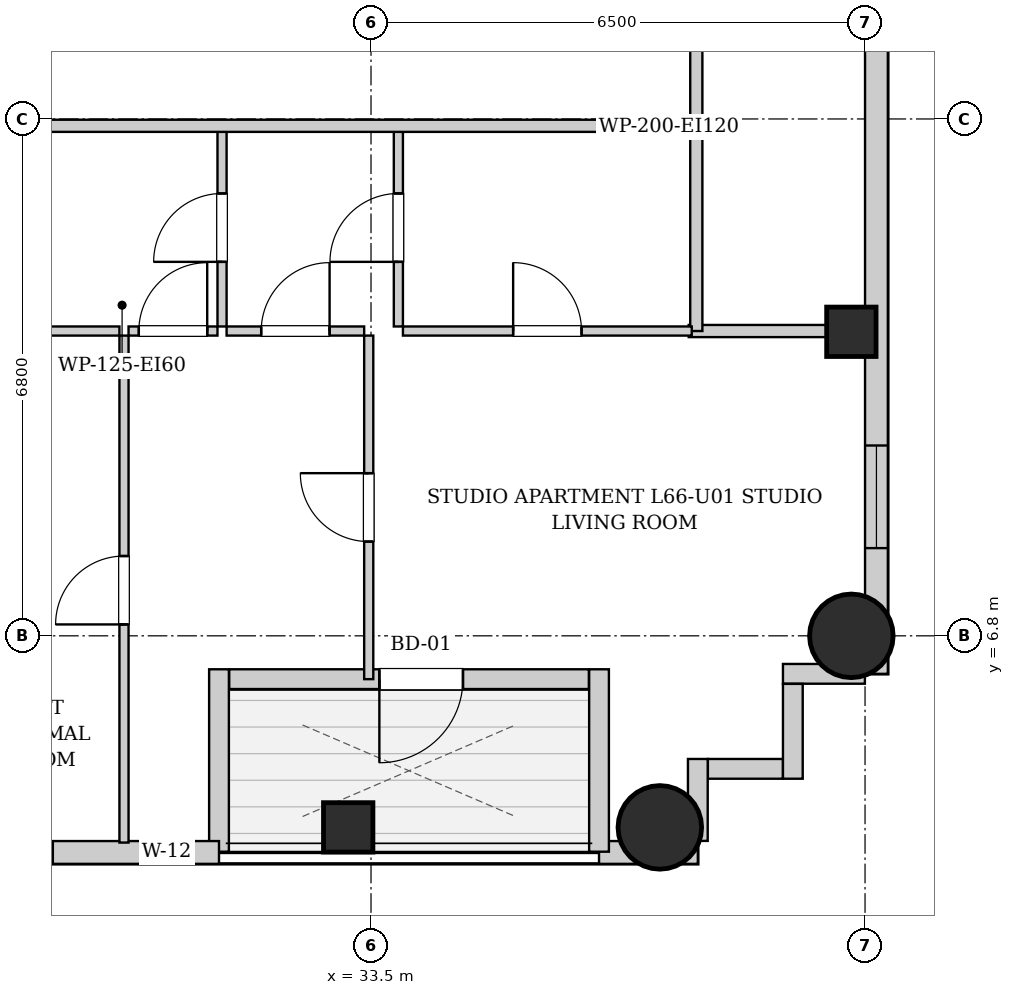
"""IFC4 building model, lengths in metres.
Left out: names, types, materials, properties, quantities, classifications, styles, units other than length and angle.
Written with IfcOpenShell. Run it as: python <this file> out.ifc"""

import sys

from ifc_helpers import new_model, si_unit, direction, frame, frame_2d, origin, origin_2d, place, context, subcontext, project, spatial, rectangle, circle, extrude, element, fill, save


model = new_model("IFC4")
c1 = context("Model", 3, precision=1e-05, world=origin(), true_north=direction((0.0, 1.0)))
c2 = subcontext(c1, "Body", "Model", "MODEL_VIEW")
j1 = project(units=[si_unit("LENGTHUNIT", "METRE"), si_unit("PLANEANGLEUNIT", "RADIAN")], contexts=[c1])
p1 = place(None, origin())
s1 = spatial("IfcSite", under=j1, at=p1, CompositionType="ELEMENT")
p2 = place(p1, origin())
s2 = spatial("IfcBuilding", under=s1, at=p2, CompositionType="ELEMENT")
p3 = place(p2, frame((0.0, 0.0, 227.5)))
s3 = spatial("IfcBuildingStorey", under=s2, at=p3, CompositionType="ELEMENT", Elevation=227.5)
p4 = place(p3, frame((33.2, 4.28, 0.0), z_axis=(0.0, 0.0, 1.0), x_axis=(1.0, 0.0, 0.0)))
e1 = element("IfcColumn", 1, at=p4, inside=s3, PredefinedType="COLUMN", context=c2, shape_type="SweptSolid", body=[
    extrude(rectangle(XDim=0.65, YDim=0.65, at=origin_2d()), origin(), (0.0, 0.0, 1.0), 3.4),
])
for number, where, z_axis, x_axis in (
    (2, (37.3, 4.28, 0.0), (0.0, 0.0, 1.0), (1.0, 0.0, 0.0)),
    (3, (39.82, 6.8, 0.0), (0.0, 0.0, 1.0), (1.0, 0.0, 0.0)),
):
    element("IfcColumn", number, at=place(p3, frame(where, z_axis=z_axis, x_axis=x_axis)), inside=s3, PredefinedType="COLUMN", context=c2, shape_type="SweptSolid", body=[
        extrude(circle(Radius=0.55, at=origin_2d()), origin(), (0.0, 0.0, 1.0), 3.4),
    ])
p5 = place(p3, frame((39.82, 10.8, 0.0), z_axis=(0.0, 0.0, 1.0), x_axis=(1.0, 0.0, 0.0)))
e4 = element("IfcColumn", 4, at=p5, inside=s3, PredefinedType="COLUMN", context=c2, shape_type="SweptSolid", body=[
    extrude(rectangle(XDim=0.65, YDim=0.65, at=origin_2d()), origin(), (0.0, 0.0, 1.0), 3.4),
])
p6 = place(p3, frame((40.15, 37.7, 0.0), z_axis=(0.0, 0.0, 1.0), x_axis=(0.0, -1.0, 0.0)))
e5 = element("IfcWall", 5, at=p6, inside=s3, PredefinedType="SOLIDWALL", context=c2, shape_type="SweptSolid", body=[
    extrude(rectangle(XDim=31.4, YDim=0.3, at=frame_2d((15.7, 0.0))), origin(), (0.0, 0.0, 1.0), 3.14),
])
p7 = place(p6, frame((28.396, 0.0, 0.55)))
e6 = element("IfcOpeningElement", 6, at=p7, cuts=e5, PredefinedType="OPENING", context=c2, shape_type="SweptSolid", body=[
    extrude(rectangle(XDim=1.35, YDim=1.2, at=frame_2d((0.675, 0.6))), frame((0.0, 0.16, 0.0), z_axis=(0.0, -1.0, 0.0), x_axis=(1.0, 0.0, 0.0)), (0.0, 0.0, 1.0), 0.32),
])
p8 = place(p6, frame((1.653, 0.0, 0.55)))
e7 = element("IfcOpeningElement", 7, at=p8, cuts=e5, PredefinedType="OPENING", context=c2, shape_type="SweptSolid", body=[
    extrude(rectangle(XDim=1.35, YDim=1.2, at=frame_2d((0.675, 0.6))), frame((0.0, 0.16, 0.0), z_axis=(0.0, -1.0, 0.0), x_axis=(1.0, 0.0, 0.0)), (0.0, 0.0, 1.0), 0.32),
])
p9 = place(p6, frame((19.683, 0.0, 0.55)))
e8 = element("IfcOpeningElement", 8, at=p9, cuts=e5, PredefinedType="OPENING", context=c2, shape_type="SweptSolid", body=[
    extrude(rectangle(XDim=1.35, YDim=1.2, at=frame_2d((0.675, 0.6))), frame((0.0, 0.16, 0.0), z_axis=(0.0, -1.0, 0.0), x_axis=(1.0, 0.0, 0.0)), (0.0, 0.0, 1.0), 0.32),
])
p10 = place(p6, frame((10.367, 0.0, 0.55)))
e9 = element("IfcOpeningElement", 9, at=p10, cuts=e5, PredefinedType="OPENING", context=c2, shape_type="SweptSolid", body=[
    extrude(rectangle(XDim=1.35, YDim=1.2, at=frame_2d((0.675, 0.6))), frame((0.0, 0.16, 0.0), z_axis=(0.0, -1.0, 0.0), x_axis=(1.0, 0.0, 0.0)), (0.0, 0.0, 1.0), 0.32),
])
p11 = place(p3, frame((37.8, 3.95, 0.0), z_axis=(0.0, 0.0, 1.0), x_axis=(-1.0, 0.0, 0.0)))
e10 = element("IfcWall", 10, at=p11, inside=s3, PredefinedType="SOLIDWALL", context=c2, shape_type="SweptSolid", body=[
    extrude(rectangle(XDim=1.3, YDim=0.3, at=frame_2d((0.65, 0.0))), origin(), (0.0, 0.0, 1.0), 3.14),
])
p12 = place(p3, frame((36.5, 3.96, 0.0), z_axis=(0.0, 0.0, 1.0), x_axis=(0.0, 1.0, 0.0)))
e11 = element("IfcWall", 11, at=p12, inside=s3, PredefinedType="SOLIDWALL", context=c2, shape_type="SweptSolid", body=[
    extrude(rectangle(XDim=2.4, YDim=0.26, at=frame_2d((1.2, 0.0))), origin(), (0.0, 0.0, 1.0), 3.14),
])
p13 = place(p3, frame((36.366, 6.23, 0.0), z_axis=(0.0, 0.0, 1.0), x_axis=(-1.0, 0.0, 0.0)))
e12 = element("IfcWall", 12, at=p13, inside=s3, PredefinedType="SOLIDWALL", context=c2, shape_type="SweptSolid", body=[
    extrude(rectangle(XDim=4.732, YDim=0.26, at=frame_2d((2.366, 0.0))), origin(), (0.0, 0.0, 1.0), 3.14),
])
p14 = place(p13, frame((1.656, 0.0, 0.0)))
e13 = element("IfcOpeningElement", 13, at=p14, cuts=e12, PredefinedType="OPENING", context=c2, shape_type="SweptSolid", body=[
    extrude(rectangle(XDim=1.1, YDim=2.0, at=frame_2d((0.55, 1.0))), frame((0.0, 0.14, 0.0), z_axis=(0.0, -1.0, 0.0), x_axis=(1.0, 0.0, 0.0)), (0.0, 0.0, 1.0), 0.28),
])
p15 = place(p3, frame((31.5, 6.36, 0.0), z_axis=(0.0, 0.0, 1.0), x_axis=(0.0, -1.0, 0.0)))
e14 = element("IfcWall", 14, at=p15, inside=s3, PredefinedType="SOLIDWALL", context=c2, shape_type="SweptSolid", body=[
    extrude(rectangle(XDim=2.4, YDim=0.26, at=frame_2d((1.2, 0.0))), origin(), (0.0, 0.0, 1.0), 3.14),
])
p16 = place(p3, frame((31.5, 3.95, 0.0), z_axis=(0.0, 0.0, 1.0), x_axis=(-1.0, 0.0, 0.0)))
e15 = element("IfcWall", 15, at=p16, inside=s3, PredefinedType="SOLIDWALL", context=c2, shape_type="SweptSolid", body=[
    extrude(rectangle(XDim=12.5, YDim=0.3, at=frame_2d((6.25, 0.0))), origin(), (0.0, 0.0, 1.0), 3.14),
])
p17 = place(p16, frame((11.171, 0.0, 0.55)))
e16 = element("IfcOpeningElement", 16, at=p17, cuts=e15, PredefinedType="OPENING", context=c2, shape_type="SweptSolid", body=[
    extrude(rectangle(XDim=0.85, YDim=1.2, at=frame_2d((0.425, 0.6))), frame((0.0, 0.16, 0.0), z_axis=(0.0, -1.0, 0.0), x_axis=(1.0, 0.0, 0.0)), (0.0, 0.0, 1.0), 0.32),
])
p18 = place(p16, frame((9.0, 0.0, 0.55)))
e17 = element("IfcOpeningElement", 17, at=p18, cuts=e15, PredefinedType="OPENING", context=c2, shape_type="SweptSolid", body=[
    extrude(rectangle(XDim=1.35, YDim=1.2, at=frame_2d((0.675, 0.6))), frame((0.0, 0.16, 0.0), z_axis=(0.0, -1.0, 0.0), x_axis=(1.0, 0.0, 0.0)), (0.0, 0.0, 1.0), 0.32),
])
p19 = place(p16, frame((2.186, 0.0, 0.55)))
e18 = element("IfcOpeningElement", 18, at=p19, cuts=e15, PredefinedType="OPENING", context=c2, shape_type="SweptSolid", body=[
    extrude(rectangle(XDim=1.35, YDim=1.2, at=frame_2d((0.675, 0.6))), frame((0.0, 0.16, 0.0), z_axis=(0.0, -1.0, 0.0), x_axis=(1.0, 0.0, 0.0)), (0.0, 0.0, 1.0), 0.32),
])
p20 = place(p16, frame((0.35, 0.0, 0.55)))
e19 = element("IfcOpeningElement", 19, at=p20, cuts=e15, PredefinedType="OPENING", context=c2, shape_type="SweptSolid", body=[
    extrude(rectangle(XDim=0.68, YDim=1.2, at=frame_2d((0.34, 0.6))), frame((0.0, 0.16, 0.0), z_axis=(0.0, -1.0, 0.0), x_axis=(1.0, 0.0, 0.0)), (0.0, 0.0, 1.0), 0.32),
])
p21 = place(p3, frame((39.998, 6.3, 0.0), z_axis=(0.0, 0.0, 1.0), x_axis=(-1.0, 0.0, 0.0)))
e20 = element("IfcWall", 20, at=p21, inside=s3, PredefinedType="SOLIDWALL", context=c2, shape_type="SweptSolid", body=[
    extrude(rectangle(XDim=1.078, YDim=0.26, at=frame_2d((0.539, 0.0))), origin(), (0.0, 0.0, 1.0), 3.14),
])
p22 = place(p3, frame((39.05, 6.168, 0.0), z_axis=(0.0, 0.0, 1.0), x_axis=(0.0, -1.0, 0.0)))
e21 = element("IfcWall", 21, at=p22, inside=s3, PredefinedType="SOLIDWALL", context=c2, shape_type="SweptSolid", body=[
    extrude(rectangle(XDim=1.248, YDim=0.26, at=frame_2d((0.624, 0.0))), origin(), (0.0, 0.0, 1.0), 3.14),
])
p23 = place(p3, frame((38.918, 5.05, 0.0), z_axis=(0.0, 0.0, 1.0), x_axis=(-1.0, 0.0, 0.0)))
e22 = element("IfcWall", 22, at=p23, inside=s3, PredefinedType="SOLIDWALL", context=c2, shape_type="SweptSolid", body=[
    extrude(rectangle(XDim=0.986, YDim=0.26, at=frame_2d((0.493, 0.0))), origin(), (0.0, 0.0, 1.0), 3.14),
])
p24 = place(p3, frame((37.8, 5.18, 0.0), z_axis=(0.0, 0.0, 1.0), x_axis=(0.0, -1.0, 0.0)))
e23 = element("IfcWall", 23, at=p24, inside=s3, PredefinedType="SOLIDWALL", context=c2, shape_type="SweptSolid", body=[
    extrude(rectangle(XDim=1.078, YDim=0.26, at=frame_2d((0.539, 0.0))), origin(), (0.0, 0.0, 1.0), 3.14),
])
p25 = place(p3, frame((37.78, 13.51, 0.0), z_axis=(0.0, 0.0, 1.0), x_axis=(0.0, 1.0, 0.0)))
e24 = element("IfcWall", 24, at=p25, inside=s3, PredefinedType="PARTITIONING", context=c2, shape_type="SweptSolid", body=[
    extrude(rectangle(XDim=1.58, YDim=0.16, at=frame_2d((0.79, 0.0))), origin(), (0.0, 0.0, 1.0), 3.14),
])
p26 = place(p3, frame((37.68, 10.81, 0.0), z_axis=(0.0, 0.0, 1.0), x_axis=(1.0, 0.0, 0.0)))
e25 = element("IfcWall", 25, at=p26, inside=s3, PredefinedType="PARTITIONING", context=c2, shape_type="SweptSolid", body=[
    extrude(rectangle(XDim=2.34, YDim=0.16, at=frame_2d((1.17, 0.0))), origin(), (0.0, 0.0, 1.0), 3.14),
])
p27 = place(p3, frame((37.78, 10.81, 0.0), z_axis=(0.0, 0.0, 1.0), x_axis=(0.0, 1.0, 0.0)))
e26 = element("IfcWall", 26, at=p27, inside=s3, PredefinedType="PARTITIONING", context=c2, shape_type="SweptSolid", body=[
    extrude(rectangle(XDim=2.66, YDim=0.16, at=frame_2d((1.33, 0.0))), origin(), (0.0, 0.0, 1.0), 3.14),
])
p28 = place(p3, frame((31.54, 10.87, 0.0), z_axis=(0.0, 0.0, 1.0), x_axis=(0.0, 1.0, 0.0)))
e27 = element("IfcWall", 27, at=p28, inside=s3, PredefinedType="PARTITIONING", context=c2, shape_type="SweptSolid", body=[
    extrude(rectangle(XDim=2.6, YDim=0.12, at=frame_2d((1.3, 0.0))), origin(), (0.0, 0.0, 1.0), 3.14),
])
p29 = place(p28, frame((0.85, 0.0, 0.0)))
e28 = element("IfcOpeningElement", 28, at=p29, cuts=e27, PredefinedType="OPENING", context=c2, shape_type="SweptSolid", body=[
    extrude(rectangle(XDim=0.9, YDim=2.05, at=frame_2d((0.45, 1.025))), frame((0.0, 0.07, 0.0), z_axis=(0.0, -1.0, 0.0), x_axis=(1.0, 0.0, 0.0)), (0.0, 0.0, 1.0), 0.14),
])
p30 = place(p3, frame((29.28, 10.81, 0.0), z_axis=(0.0, 0.0, 1.0), x_axis=(1.0, 0.0, 0.0)))
e29 = element("IfcWall", 29, at=p30, inside=s3, PredefinedType="PARTITIONING", context=c2, shape_type="SweptSolid", body=[
    extrude(rectangle(XDim=0.91, YDim=0.12, at=frame_2d((0.455, 0.0))), origin(), (0.0, 0.0, 1.0), 3.14),
])
p31 = place(p3, frame((30.31, 10.81, 0.0), z_axis=(0.0, 0.0, 1.0), x_axis=(1.0, 0.0, 0.0)))
e30 = element("IfcWall", 30, at=p31, inside=s3, PredefinedType="PARTITIONING", context=c2, shape_type="SweptSolid", body=[
    extrude(rectangle(XDim=1.17, YDim=0.12, at=frame_2d((0.585, 0.0))), origin(), (0.0, 0.0, 1.0), 3.14),
])
p32 = place(p31, frame((0.135, 0.0, 0.0)))
e31 = element("IfcOpeningElement", 31, at=p32, cuts=e30, PredefinedType="OPENING", context=c2, shape_type="SweptSolid", body=[
    extrude(rectangle(XDim=0.9, YDim=2.05, at=frame_2d((0.45, 1.025))), frame((0.0, 0.07, 0.0), z_axis=(0.0, -1.0, 0.0), x_axis=(1.0, 0.0, 0.0)), (0.0, 0.0, 1.0), 0.14),
])
p33 = place(p3, frame((33.86, 10.87, 0.0), z_axis=(0.0, 0.0, 1.0), x_axis=(0.0, 1.0, 0.0)))
e32 = element("IfcWall", 32, at=p33, inside=s3, PredefinedType="PARTITIONING", context=c2, shape_type="SweptSolid", body=[
    extrude(rectangle(XDim=2.6, YDim=0.12, at=frame_2d((1.3, 0.0))), origin(), (0.0, 0.0, 1.0), 3.14),
])
p34 = place(p33, frame((0.85, 0.0, 0.0)))
e33 = element("IfcOpeningElement", 33, at=p34, cuts=e32, PredefinedType="OPENING", context=c2, shape_type="SweptSolid", body=[
    extrude(rectangle(XDim=0.9, YDim=2.05, at=frame_2d((0.45, 1.025))), frame((0.0, 0.07, 0.0), z_axis=(0.0, -1.0, 0.0), x_axis=(1.0, 0.0, 0.0)), (0.0, 0.0, 1.0), 0.14),
])
p35 = place(p3, frame((31.6, 10.81, 0.0), z_axis=(0.0, 0.0, 1.0), x_axis=(1.0, 0.0, 0.0)))
e34 = element("IfcWall", 34, at=p35, inside=s3, PredefinedType="PARTITIONING", context=c2, shape_type="SweptSolid", body=[
    extrude(rectangle(XDim=1.81, YDim=0.12, at=frame_2d((0.905, 0.0))), origin(), (0.0, 0.0, 1.0), 3.14),
])
p36 = place(p35, frame((0.455, 0.0, 0.0)))
e35 = element("IfcOpeningElement", 35, at=p36, cuts=e34, PredefinedType="OPENING", context=c2, shape_type="SweptSolid", body=[
    extrude(rectangle(XDim=0.9, YDim=2.05, at=frame_2d((0.45, 1.025))), frame((0.0, 0.07, 0.0), z_axis=(0.0, -1.0, 0.0), x_axis=(1.0, 0.0, 0.0)), (0.0, 0.0, 1.0), 0.14),
])
p37 = place(p3, frame((33.92, 10.81, 0.0), z_axis=(0.0, 0.0, 1.0), x_axis=(1.0, 0.0, 0.0)))
e36 = element("IfcWall", 36, at=p37, inside=s3, PredefinedType="PARTITIONING", context=c2, shape_type="SweptSolid", body=[
    extrude(rectangle(XDim=3.8, YDim=0.12, at=frame_2d((1.9, 0.0))), origin(), (0.0, 0.0, 1.0), 3.14),
])
p38 = place(p37, frame((1.45, 0.0, 0.0)))
e37 = element("IfcOpeningElement", 37, at=p38, cuts=e36, PredefinedType="OPENING", context=c2, shape_type="SweptSolid", body=[
    extrude(rectangle(XDim=0.9, YDim=2.05, at=frame_2d((0.45, 1.025))), frame((0.0, 0.07, 0.0), z_axis=(0.0, -1.0, 0.0), x_axis=(1.0, 0.0, 0.0)), (0.0, 0.0, 1.0), 0.14),
])
p39 = place(p3, frame((30.25, 4.08, 0.0), z_axis=(0.0, 0.0, 1.0), x_axis=(0.0, 1.0, 0.0)))
e38 = element("IfcWall", 38, at=p39, inside=s3, PredefinedType="PARTITIONING", context=c2, shape_type="SweptSolid", body=[
    extrude(rectangle(XDim=6.67, YDim=0.12, at=frame_2d((3.335, 0.0))), origin(), (0.0, 0.0, 1.0), 3.14),
])
p40 = place(p39, frame((2.87, 0.0, 0.0)))
e39 = element("IfcOpeningElement", 39, at=p40, cuts=e38, PredefinedType="OPENING", context=c2, shape_type="SweptSolid", body=[
    extrude(rectangle(XDim=0.9, YDim=2.05, at=frame_2d((0.45, 1.025))), frame((0.0, 0.07, 0.0), z_axis=(0.0, -1.0, 0.0), x_axis=(1.0, 0.0, 0.0)), (0.0, 0.0, 1.0), 0.14),
])
p41 = place(p3, frame((33.47, 6.23, 0.0), z_axis=(0.0, 0.0, 1.0), x_axis=(0.0, 1.0, 0.0)))
e40 = element("IfcWall", 40, at=p41, inside=s3, PredefinedType="PARTITIONING", context=c2, shape_type="SweptSolid", body=[
    extrude(rectangle(XDim=4.52, YDim=0.12, at=frame_2d((2.26, 0.0))), origin(), (0.0, 0.0, 1.0), 3.14),
])
p42 = place(p41, frame((1.81, 0.0, 0.0)))
e41 = element("IfcOpeningElement", 41, at=p42, cuts=e40, PredefinedType="OPENING", context=c2, shape_type="SweptSolid", body=[
    extrude(rectangle(XDim=0.9, YDim=2.05, at=frame_2d((0.45, 1.025))), frame((0.0, 0.07, 0.0), z_axis=(0.0, -1.0, 0.0), x_axis=(1.0, 0.0, 0.0)), (0.0, 0.0, 1.0), 0.14),
])
p43 = place(p3, frame((13.15, 13.51, 0.0), z_axis=(0.0, 0.0, 1.0), x_axis=(1.0, 0.0, 0.0)))
e42 = element("IfcWall", 42, at=p43, inside=s3, PredefinedType="PARTITIONING", context=c2, shape_type="SweptSolid", body=[
    extrude(rectangle(XDim=24.6, YDim=0.16, at=frame_2d((12.3, 0.0))), origin(), (0.0, 0.0, 1.0), 3.14),
])
p44 = place(p43, frame((3.165, 0.0, 0.0)))
e43 = element("IfcOpeningElement", 43, at=p44, cuts=e42, PredefinedType="OPENING", context=c2, shape_type="SweptSolid", body=[
    extrude(rectangle(XDim=0.95, YDim=2.1, at=frame_2d((0.475, 1.05))), frame((0.0, 0.09, 0.0), z_axis=(0.0, -1.0, 0.0), x_axis=(1.0, 0.0, 0.0)), (0.0, 0.0, 1.0), 0.18),
])
p45 = place(p29, origin())
e44 = element("IfcDoor", 44, at=p45, inside=s3, OperationType="SINGLE_SWING_LEFT", PredefinedType="DOOR", context=c2, shape_type="SweptSolid", body=[
    extrude(rectangle(XDim=0.9, YDim=2.05, at=frame_2d((0.45, 1.025))), frame((0.0, 0.025, 0.0), z_axis=(0.0, -1.0, 0.0), x_axis=(1.0, 0.0, 0.0)), (0.0, 0.0, 1.0), 0.05),
])
fill(e28, e44)
p46 = place(p32, origin())
e45 = element("IfcDoor", 45, at=p46, inside=s3, OperationType="SINGLE_SWING_RIGHT", PredefinedType="DOOR", context=c2, shape_type="SweptSolid", body=[
    extrude(rectangle(XDim=0.9, YDim=2.05, at=frame_2d((0.45, 1.025))), frame((0.0, 0.025, 0.0), z_axis=(0.0, -1.0, 0.0), x_axis=(1.0, 0.0, 0.0)), (0.0, 0.0, 1.0), 0.05),
])
fill(e31, e45)
p47 = place(p34, origin())
e46 = element("IfcDoor", 46, at=p47, inside=s3, OperationType="SINGLE_SWING_LEFT", PredefinedType="DOOR", context=c2, shape_type="SweptSolid", body=[
    extrude(rectangle(XDim=0.9, YDim=2.05, at=frame_2d((0.45, 1.025))), frame((0.0, 0.025, 0.0), z_axis=(0.0, -1.0, 0.0), x_axis=(1.0, 0.0, 0.0)), (0.0, 0.0, 1.0), 0.05),
])
fill(e33, e46)
p48 = place(p36, origin())
e47 = element("IfcDoor", 47, at=p48, inside=s3, OperationType="SINGLE_SWING_RIGHT", PredefinedType="DOOR", context=c2, shape_type="SweptSolid", body=[
    extrude(rectangle(XDim=0.9, YDim=2.05, at=frame_2d((0.45, 1.025))), frame((0.0, 0.025, 0.0), z_axis=(0.0, -1.0, 0.0), x_axis=(1.0, 0.0, 0.0)), (0.0, 0.0, 1.0), 0.05),
])
fill(e35, e47)
p49 = place(p38, origin())
e48 = element("IfcDoor", 48, at=p49, inside=s3, OperationType="SINGLE_SWING_LEFT", PredefinedType="DOOR", context=c2, shape_type="SweptSolid", body=[
    extrude(rectangle(XDim=0.9, YDim=2.05, at=frame_2d((0.45, 1.025))), frame((0.0, 0.025, 0.0), z_axis=(0.0, -1.0, 0.0), x_axis=(1.0, 0.0, 0.0)), (0.0, 0.0, 1.0), 0.05),
])
fill(e37, e48)
p50 = place(p40, origin())
e49 = element("IfcDoor", 49, at=p50, inside=s3, OperationType="SINGLE_SWING_LEFT", PredefinedType="DOOR", context=c2, shape_type="SweptSolid", body=[
    extrude(rectangle(XDim=0.9, YDim=2.05, at=frame_2d((0.45, 1.025))), frame((0.0, 0.025, 0.0), z_axis=(0.0, -1.0, 0.0), x_axis=(1.0, 0.0, 0.0)), (0.0, 0.0, 1.0), 0.05),
])
fill(e39, e49)
p51 = place(p42, origin())
e50 = element("IfcDoor", 50, at=p51, inside=s3, OperationType="SINGLE_SWING_RIGHT", PredefinedType="DOOR", context=c2, shape_type="SweptSolid", body=[
    extrude(rectangle(XDim=0.9, YDim=2.05, at=frame_2d((0.45, 1.025))), frame((0.0, 0.025, 0.0), z_axis=(0.0, -1.0, 0.0), x_axis=(1.0, 0.0, 0.0)), (0.0, 0.0, 1.0), 0.05),
])
fill(e41, e50)
p52 = place(p14, origin())
e51 = element("IfcDoor", 51, at=p52, inside=s3, OperationType="SINGLE_SWING_RIGHT", PredefinedType="DOOR", context=c2, shape_type="SweptSolid", body=[
    extrude(rectangle(XDim=1.1, YDim=2.0, at=frame_2d((0.55, 1.0))), frame((0.0, 0.025, 0.0), z_axis=(0.0, -1.0, 0.0), x_axis=(1.0, 0.0, 0.0)), (0.0, 0.0, 1.0), 0.05),
])
fill(e13, e51)
p53 = place(p19, origin())
e52 = element("IfcWindow", 52, at=p53, inside=s3, PartitioningType="SINGLE_PANEL", PredefinedType="WINDOW", context=c2, shape_type="SweptSolid", body=[
    extrude(rectangle(XDim=1.35, YDim=1.2, at=frame_2d((0.675, 0.6))), frame((0.0, 0.03, 0.0), z_axis=(0.0, -1.0, 0.0), x_axis=(1.0, 0.0, 0.0)), (0.0, 0.0, 1.0), 0.06),
])
fill(e18, e52)
p54 = place(p20, origin())
e53 = element("IfcWindow", 53, at=p54, inside=s3, PartitioningType="SINGLE_PANEL", PredefinedType="WINDOW", context=c2, shape_type="SweptSolid", body=[
    extrude(rectangle(XDim=0.68, YDim=1.2, at=frame_2d((0.34, 0.6))), frame((0.0, 0.03, 0.0), z_axis=(0.0, -1.0, 0.0), x_axis=(1.0, 0.0, 0.0)), (0.0, 0.0, 1.0), 0.06),
])
fill(e19, e53)
p55 = place(p7, origin())
e54 = element("IfcWindow", 54, at=p55, inside=s3, PartitioningType="SINGLE_PANEL", PredefinedType="WINDOW", context=c2, shape_type="SweptSolid", body=[
    extrude(rectangle(XDim=1.35, YDim=1.2, at=frame_2d((0.675, 0.6))), frame((0.0, 0.03, 0.0), z_axis=(0.0, -1.0, 0.0), x_axis=(1.0, 0.0, 0.0)), (0.0, 0.0, 1.0), 0.06),
])
fill(e6, e54)
save(model, sys.argv[1])
